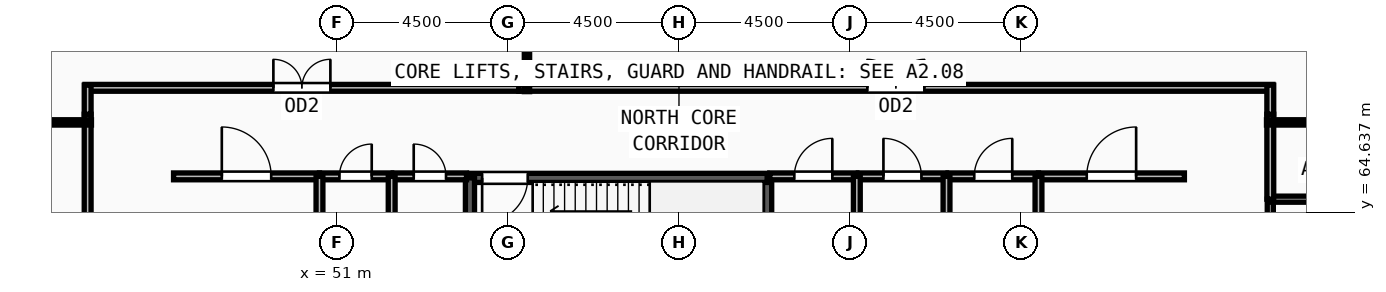
"""IFC4 building model, lengths in metres.
Left out: names, types, materials, properties, quantities, classifications, styles, units other than length and angle.
Written with IfcOpenShell. Run it as: python <this file> out.ifc"""

import sys

from ifc_helpers import new_model, si_unit, direction, frame, frame_2d, origin, place, context, subcontext, project, spatial, rectangle, extrude, source, transform, mapped, element, fill, save


model = new_model("IFC4")
c1 = context("Model", 3, precision=1e-05, world=origin(), true_north=direction((0.0, 1.0)))
c2 = subcontext(c1, "Body", "Model", "MODEL_VIEW")
j1 = project(units=[si_unit("LENGTHUNIT", "METRE"), si_unit("PLANEANGLEUNIT", "RADIAN")], contexts=[c1])
p1 = place(None, origin())
s1 = spatial("IfcSite", under=j1, at=p1, CompositionType="ELEMENT")
p2 = place(p1, origin())
s2 = spatial("IfcBuilding", under=s1, at=p2, CompositionType="ELEMENT")
p3 = place(p2, frame((0.0, 0.0, 39.75)))
s3 = spatial("IfcBuildingStorey", under=s2, at=p3, CompositionType="ELEMENT", Elevation=39.75)
p4 = place(p3, frame((62.32, 62.1, 0.0), z_axis=(0.0, 0.0, 1.0), x_axis=(0.0, 1.0, 0.0)))
e1 = element("IfcWall", 1, at=p4, inside=s3, PredefinedType="SOLIDWALL", context=c2, shape_type="SweptSolid", body=[
    extrude(rectangle(XDim=3.44, YDim=0.24, at=frame_2d((1.72, 0.0))), origin(), (0.0, 0.0, 1.0), 3.57),
])
p5 = place(p3, frame((62.32, 65.54, 0.0), z_axis=(0.0, 0.0, 1.0), x_axis=(-1.0, 0.0, 0.0)))
e2 = element("IfcWall", 2, at=p5, inside=s3, PredefinedType="SOLIDWALL", context=c2, shape_type="SweptSolid", body=[
    extrude(rectangle(XDim=7.82, YDim=0.24, at=frame_2d((3.91, 0.0))), origin(), (0.0, 0.0, 1.0), 3.57),
])
m1 = source(origin(), c2, "Body", "SweptSolid", [
    extrude(rectangle(XDim=1.2, YDim=2.2, at=frame_2d((0.6, 1.1))), frame((0.0, 0.13, 0.0), z_axis=(0.0, -1.0, 0.0), x_axis=(1.0, 0.0, 0.0)), (0.0, 0.0, 1.0), 0.26),
])
p6 = place(p5, frame((6.3, 0.0, 0.0)))
e3 = element("IfcOpeningElement", 3, at=p6, cuts=e2, PredefinedType="OPENING", context=c2, shape_type="MappedRepresentation", body=[
    mapped(m1, transform((0.0, 0.0, 0.0), x_axis=(1.0, 0.0, 0.0), y_axis=(0.0, 1.0, 0.0), z_axis=(0.0, 0.0, 1.0), scale=1.0)),
])
p7 = place(p3, frame((54.5, 65.54, 0.0), z_axis=(0.0, 0.0, 1.0), x_axis=(0.0, -1.0, 0.0)))
e4 = element("IfcWall", 4, at=p7, inside=s3, PredefinedType="SOLIDWALL", context=c2, shape_type="SweptSolid", body=[
    extrude(rectangle(XDim=3.44, YDim=0.24, at=frame_2d((1.72, 0.0))), origin(), (0.0, 0.0, 1.0), 3.57),
])
p8 = place(p3, frame((75.56, 62.24, 0.0), z_axis=(0.0, 0.0, 1.0), x_axis=(0.0, 1.0, 0.0)))
e5 = element("IfcWall", 5, at=p8, inside=s3, PredefinedType="PARTITIONING", context=c2, shape_type="SweptSolid", body=[
    extrude(rectangle(XDim=2.74, YDim=0.16, at=frame_2d((1.37, 0.0))), origin(), (0.0, 0.0, 1.0), 3.57),
])
m2 = source(origin(), c2, "Body", "SweptSolid", [
    extrude(rectangle(XDim=1.05, YDim=2.15, at=frame_2d((0.525, 1.075))), frame((0.0, 0.09, 0.0), z_axis=(0.0, -1.0, 0.0), x_axis=(1.0, 0.0, 0.0)), (0.0, 0.0, 1.0), 0.18),
])
p9 = place(p8, frame((0.845, 0.0, 0.0)))
e6 = element("IfcOpeningElement", 6, at=p9, cuts=e5, PredefinedType="OPENING", context=c2, shape_type="MappedRepresentation", body=[
    mapped(m2, transform((0.0, 0.0, 0.0), x_axis=(1.0, 0.0, 0.0), y_axis=(0.0, 1.0, 0.0), z_axis=(0.0, 0.0, 1.0), scale=1.0)),
])
p10 = place(p3, frame((50.54, 65.58, 0.0), z_axis=(0.0, 0.0, 1.0), x_axis=(1.0, 0.0, 0.0)))
e7 = element("IfcWall", 7, at=p10, inside=s3, PredefinedType="PARTITIONING", context=c2, shape_type="SweptSolid", body=[
    extrude(rectangle(XDim=1.9, YDim=0.18, at=frame_2d((0.95, 0.0))), origin(), (0.0, 0.0, 1.0), 3.57),
])
m3 = source(origin(), c2, "Body", "SweptSolid", [
    extrude(rectangle(XDim=0.85, YDim=2.1, at=frame_2d((0.425, 1.05))), frame((0.0, 0.1, 0.0), z_axis=(0.0, -1.0, 0.0), x_axis=(1.0, 0.0, 0.0)), (0.0, 0.0, 1.0), 0.2),
])
p11 = place(p10, frame((0.525, 0.0, 0.0)))
e8 = element("IfcOpeningElement", 8, at=p11, cuts=e7, PredefinedType="OPENING", context=c2, shape_type="MappedRepresentation", body=[
    mapped(m3, transform((0.0, 0.0, 0.0), x_axis=(1.0, 0.0, 0.0), y_axis=(0.0, 1.0, 0.0), z_axis=(0.0, 0.0, 1.0), scale=1.0)),
])
p12 = place(p3, frame((52.48, 65.58, 0.0), z_axis=(0.0, 0.0, 1.0), x_axis=(1.0, 0.0, 0.0)))
e9 = element("IfcWall", 9, at=p12, inside=s3, PredefinedType="PARTITIONING", context=c2, shape_type="SweptSolid", body=[
    extrude(rectangle(XDim=1.93, YDim=0.18, at=frame_2d((0.965, 0.0))), origin(), (0.0, 0.0, 1.0), 3.57),
])
p13 = place(p12, frame((0.54, 0.0, 0.0)))
e10 = element("IfcOpeningElement", 10, at=p13, cuts=e9, PredefinedType="OPENING", context=c2, shape_type="MappedRepresentation", body=[
    mapped(m3, transform((0.0, 0.0, 0.0), x_axis=(1.0, 0.0, 0.0), y_axis=(0.0, 1.0, 0.0), z_axis=(0.0, 0.0, 1.0), scale=1.0)),
])
p14 = place(p3, frame((62.39, 65.58, 0.0), z_axis=(0.0, 0.0, 1.0), x_axis=(1.0, 0.0, 0.0)))
e11 = element("IfcWall", 11, at=p14, inside=s3, PredefinedType="PARTITIONING", context=c2, shape_type="SweptSolid", body=[
    extrude(rectangle(XDim=2.29, YDim=0.18, at=frame_2d((1.145, 0.0))), origin(), (0.0, 0.0, 1.0), 3.57),
])
m4 = source(origin(), c2, "Body", "SweptSolid", [
    extrude(rectangle(XDim=1.0, YDim=2.2, at=frame_2d((0.5, 1.1))), frame((0.0, 0.1, 0.0), z_axis=(0.0, -1.0, 0.0), x_axis=(1.0, 0.0, 0.0)), (0.0, 0.0, 1.0), 0.2),
])
p15 = place(p14, frame((0.645, 0.0, 0.0)))
e12 = element("IfcOpeningElement", 12, at=p15, cuts=e11, PredefinedType="OPENING", context=c2, shape_type="MappedRepresentation", body=[
    mapped(m4, transform((0.0, 0.0, 0.0), x_axis=(1.0, 0.0, 0.0), y_axis=(0.0, 1.0, 0.0), z_axis=(0.0, 0.0, 1.0), scale=1.0)),
])
p16 = place(p3, frame((64.72, 65.58, 0.0), z_axis=(0.0, 0.0, 1.0), x_axis=(1.0, 0.0, 0.0)))
e13 = element("IfcWall", 13, at=p16, inside=s3, PredefinedType="PARTITIONING", context=c2, shape_type="SweptSolid", body=[
    extrude(rectangle(XDim=2.32, YDim=0.18, at=frame_2d((1.16, 0.0))), origin(), (0.0, 0.0, 1.0), 3.57),
])
p17 = place(p16, frame((0.66, 0.0, 0.0)))
e14 = element("IfcOpeningElement", 14, at=p17, cuts=e13, PredefinedType="OPENING", context=c2, shape_type="MappedRepresentation", body=[
    mapped(m4, transform((0.0, 0.0, 0.0), x_axis=(1.0, 0.0, 0.0), y_axis=(0.0, 1.0, 0.0), z_axis=(0.0, 0.0, 1.0), scale=1.0)),
])
p18 = place(p3, frame((67.08, 65.58, 0.0), z_axis=(0.0, 0.0, 1.0), x_axis=(1.0, 0.0, 0.0)))
e15 = element("IfcWall", 15, at=p18, inside=s3, PredefinedType="PARTITIONING", context=c2, shape_type="SweptSolid", body=[
    extrude(rectangle(XDim=2.38, YDim=0.18, at=frame_2d((1.19, 0.0))), origin(), (0.0, 0.0, 1.0), 3.57),
])
p19 = place(p18, frame((0.69, 0.0, 0.0)))
e16 = element("IfcOpeningElement", 16, at=p19, cuts=e15, PredefinedType="OPENING", context=c2, shape_type="MappedRepresentation", body=[
    mapped(m4, transform((0.0, 0.0, 0.0), x_axis=(1.0, 0.0, 0.0), y_axis=(0.0, 1.0, 0.0), z_axis=(0.0, 0.0, 1.0), scale=1.0)),
])
p20 = place(p3, frame((46.7, 65.58, 0.0), z_axis=(0.0, 0.0, 1.0), x_axis=(1.0, 0.0, 0.0)))
e17 = element("IfcWall", 17, at=p20, inside=s3, PredefinedType="PARTITIONING", context=c2, shape_type="SweptSolid", body=[
    extrude(rectangle(XDim=3.84, YDim=0.18, at=frame_2d((1.92, 0.0))), origin(), (0.0, 0.0, 1.0), 3.57),
])
m5 = source(origin(), c2, "Body", "SweptSolid", [
    extrude(rectangle(XDim=1.3, YDim=2.2, at=frame_2d((0.65, 1.1))), frame((0.0, 0.1, 0.0), z_axis=(0.0, -1.0, 0.0), x_axis=(1.0, 0.0, 0.0)), (0.0, 0.0, 1.0), 0.2),
])
p21 = place(p20, frame((1.27, 0.0, 0.0)))
e18 = element("IfcOpeningElement", 18, at=p21, cuts=e17, PredefinedType="OPENING", context=c2, shape_type="MappedRepresentation", body=[
    mapped(m5, transform((0.0, 0.0, 0.0), x_axis=(1.0, 0.0, 0.0), y_axis=(0.0, 1.0, 0.0), z_axis=(0.0, 0.0, 1.0), scale=1.0)),
])
p22 = place(p3, frame((69.46, 65.58, 0.0), z_axis=(0.0, 0.0, 1.0), x_axis=(1.0, 0.0, 0.0)))
e19 = element("IfcWall", 19, at=p22, inside=s3, PredefinedType="PARTITIONING", context=c2, shape_type="SweptSolid", body=[
    extrude(rectangle(XDim=3.84, YDim=0.18, at=frame_2d((1.92, 0.0))), origin(), (0.0, 0.0, 1.0), 3.57),
])
p23 = place(p22, frame((1.27, 0.0, 0.0)))
e20 = element("IfcOpeningElement", 20, at=p23, cuts=e19, PredefinedType="OPENING", context=c2, shape_type="MappedRepresentation", body=[
    mapped(m5, transform((0.0, 0.0, 0.0), x_axis=(1.0, 0.0, 0.0), y_axis=(0.0, 1.0, 0.0), z_axis=(0.0, 0.0, 1.0), scale=1.0)),
])
p24 = place(p3, frame((55.785, 67.91, 0.0), z_axis=(0.0, 0.0, 1.0), x_axis=(1.0, 0.0, 0.0)))
e21 = element("IfcWall", 21, at=p24, inside=s3, PredefinedType="PARTITIONING", context=c2, shape_type="SweptSolid", body=[
    extrude(rectangle(XDim=19.845, YDim=0.18, at=frame_2d((9.922, 0.0))), origin(), (0.0, 0.0, 1.0), 3.57),
])
m6 = source(origin(), c2, "Body", "SweptSolid", [
    extrude(rectangle(XDim=1.5, YDim=2.2, at=frame_2d((0.75, 1.1))), frame((0.0, 0.1, 0.0), z_axis=(0.0, -1.0, 0.0), x_axis=(1.0, 0.0, 0.0)), (0.0, 0.0, 1.0), 0.2),
])
p25 = place(p24, frame((9.172, 0.0, 0.0)))
e22 = element("IfcOpeningElement", 22, at=p25, cuts=e21, PredefinedType="OPENING", context=c2, shape_type="MappedRepresentation", body=[
    mapped(m6, transform((0.0, 0.0, 0.0), x_axis=(1.0, 0.0, 0.0), y_axis=(0.0, 1.0, 0.0), z_axis=(0.0, 0.0, 1.0), scale=1.0)),
])
p26 = place(p3, frame((44.37, 67.91, 0.0), z_axis=(0.0, 0.0, 1.0), x_axis=(1.0, 0.0, 0.0)))
e23 = element("IfcWall", 23, at=p26, inside=s3, PredefinedType="PARTITIONING", context=c2, shape_type="SweptSolid", body=[
    extrude(rectangle(XDim=11.415, YDim=0.18, at=frame_2d((5.708, 0.0))), origin(), (0.0, 0.0, 1.0), 3.57),
])
p27 = place(p26, frame((4.957, 0.0, 0.0)))
e24 = element("IfcOpeningElement", 24, at=p27, cuts=e23, PredefinedType="OPENING", context=c2, shape_type="MappedRepresentation", body=[
    mapped(m6, transform((0.0, 0.0, 0.0), x_axis=(1.0, 0.0, 0.0), y_axis=(0.0, 1.0, 0.0), z_axis=(0.0, 0.0, 1.0), scale=1.0)),
])
p28 = place(p3, frame((44.44, 54.785, 0.0), z_axis=(0.0, 0.0, 1.0), x_axis=(0.0, 1.0, 0.0)))
e25 = element("IfcWall", 25, at=p28, inside=s3, PredefinedType="PARTITIONING", context=c2, shape_type="SweptSolid", body=[
    extrude(rectangle(XDim=12.43, YDim=0.18, at=frame_2d((6.215, 0.0))), origin(), (0.0, 0.0, 1.0), 3.57),
])
p29 = place(p28, frame((5.465, 0.0, 0.0)))
e26 = element("IfcOpeningElement", 26, at=p29, cuts=e25, PredefinedType="OPENING", context=c2, shape_type="MappedRepresentation", body=[
    mapped(m6, transform((0.0, 0.0, 0.0), x_axis=(1.0, 0.0, 0.0), y_axis=(0.0, 1.0, 0.0), z_axis=(0.0, 0.0, 1.0), scale=1.0)),
])
p30 = place(p3, frame((75.56, 64.98, 0.0), z_axis=(0.0, 0.0, 1.0), x_axis=(1.0, 0.0, 0.0)))
e27 = element("IfcWall", 27, at=p30, inside=s3, PredefinedType="PARTITIONING", context=c2, shape_type="SweptSolid", body=[
    extrude(rectangle(XDim=4.46, YDim=0.16, at=frame_2d((2.23, 0.0))), origin(), (0.0, 0.0, 1.0), 3.57),
])
for number, where, z_axis, x_axis in (
    (28, (50.54, 61.95, 0.0), (0.0, 0.0, 1.0), (0.0, 1.0, 0.0)),
    (29, (52.44, 61.95, 0.0), (0.0, 0.0, 1.0), (0.0, 1.0, 0.0)),
    (30, (64.68, 61.95, 0.0), (0.0, 0.0, 1.0), (0.0, 1.0, 0.0)),
    (31, (67.04, 61.95, 0.0), (0.0, 0.0, 1.0), (0.0, 1.0, 0.0)),
    (32, (69.46, 61.95, 0.0), (0.0, 0.0, 1.0), (0.0, 1.0, 0.0)),
):
    element("IfcWall", number, at=place(p3, frame(where, z_axis=z_axis, x_axis=x_axis)), inside=s3, PredefinedType="PARTITIONING", context=c2, shape_type="SweptSolid", body=[
        extrude(rectangle(XDim=3.63, YDim=0.18, at=frame_2d((1.815, 0.0))), origin(), (0.0, 0.0, 1.0), 3.57),
    ])
p31 = place(p3, frame((75.56, 67.215, 0.0), z_axis=(0.0, 0.0, 1.0), x_axis=(0.0, -1.0, 0.0)))
e33 = element("IfcWall", 33, at=p31, inside=s3, PredefinedType="PARTITIONING", context=c2, shape_type="SweptSolid", body=[
    extrude(rectangle(XDim=2.235, YDim=0.18, at=frame_2d((1.118, 0.0))), origin(), (0.0, 0.0, 1.0), 3.57),
])
for number, where, z_axis, x_axis in (
    (34, (75.56, 67.98, 0.0), (0.0, 0.0, 1.0), (0.0, -1.0, 0.0)),
    (35, (44.44, 67.215, 0.0), (0.0, 0.0, 1.0), (0.0, 1.0, 0.0)),
):
    element("IfcWall", number, at=place(p3, frame(where, z_axis=z_axis, x_axis=x_axis)), inside=s3, PredefinedType="PARTITIONING", context=c2, shape_type="SweptSolid", body=[
        extrude(rectangle(XDim=0.765, YDim=0.18, at=frame_2d((0.382, 0.0))), origin(), (0.0, 0.0, 1.0), 3.57),
    ])
p32 = place(p3, frame((44.54, 67.0, 0.0), z_axis=(0.0, 0.0, 1.0), x_axis=(-1.0, 0.0, 0.0)))
e36 = element("IfcWall", 36, at=p32, inside=s3, PredefinedType="PARTITIONING", context=c2, shape_type="SweptSolid", body=[
    extrude(rectangle(XDim=23.084, YDim=0.14, at=frame_2d((11.542, 0.0))), origin(), (0.0, 0.0, 1.0), 2.655),
])
p33 = place(p3, frame((75.46, 67.0, 0.0), z_axis=(0.0, 0.0, 1.0), x_axis=(1.0, 0.0, 0.0)))
e37 = element("IfcWall", 37, at=p33, inside=s3, PredefinedType="PARTITIONING", context=c2, shape_type="SweptSolid", body=[
    extrude(rectangle(XDim=23.116, YDim=0.14, at=frame_2d((11.558, 0.0))), origin(), (0.0, 0.0, 1.0), 2.655),
])
p34 = place(p3, frame((56.0, 67.81, 0.0), z_axis=(0.0, 0.0, 1.0), x_axis=(0.0, 1.0, 0.0)))
e38 = element("IfcWall", 38, at=p34, inside=s3, PredefinedType="PARTITIONING", context=c2, shape_type="SweptSolid", body=[
    extrude(rectangle(XDim=14.865, YDim=0.14, at=frame_2d((7.433, 0.0))), origin(), (0.0, 0.0, 1.0), 3.57),
])
m7 = source(origin(), c2, "Body", "SweptSolid", [
    extrude(rectangle(XDim=1.2, YDim=2.2, at=frame_2d((0.6, 1.1))), frame((0.0, 0.025, 0.0), z_axis=(0.0, -1.0, 0.0), x_axis=(1.0, 0.0, 0.0)), (0.0, 0.0, 1.0), 0.05),
])
p35 = place(p6, origin())
e39 = element("IfcDoor", 39, at=p35, inside=s3, OperationType="SINGLE_SWING_RIGHT", PredefinedType="DOOR", context=c2, shape_type="MappedRepresentation", body=[
    mapped(m7, transform((0.0, 0.0, 0.0), x_axis=(1.0, 0.0, 0.0), y_axis=(0.0, 1.0, 0.0), z_axis=(0.0, 0.0, 1.0), scale=1.0)),
])
fill(e3, e39)
m8 = source(origin(), c2, "Body", "SweptSolid", [
    extrude(rectangle(XDim=0.85, YDim=2.1, at=frame_2d((0.425, 1.05))), frame((0.0, 0.025, 0.0), z_axis=(0.0, -1.0, 0.0), x_axis=(1.0, 0.0, 0.0)), (0.0, 0.0, 1.0), 0.05),
])
p36 = place(p11, origin())
e40 = element("IfcDoor", 40, at=p36, inside=s3, OperationType="SINGLE_SWING_RIGHT", PredefinedType="DOOR", context=c2, shape_type="MappedRepresentation", body=[
    mapped(m8, transform((0.0, 0.0, 0.0), x_axis=(1.0, 0.0, 0.0), y_axis=(0.0, 1.0, 0.0), z_axis=(0.0, 0.0, 1.0), scale=1.0)),
])
fill(e8, e40)
p37 = place(p13, origin())
e41 = element("IfcDoor", 41, at=p37, inside=s3, OperationType="SINGLE_SWING_LEFT", PredefinedType="DOOR", context=c2, shape_type="MappedRepresentation", body=[
    mapped(m8, transform((0.0, 0.0, 0.0), x_axis=(1.0, 0.0, 0.0), y_axis=(0.0, 1.0, 0.0), z_axis=(0.0, 0.0, 1.0), scale=1.0)),
])
fill(e10, e41)
m9 = source(origin(), c2, "Body", "SweptSolid", [
    extrude(rectangle(XDim=1.0, YDim=2.2, at=frame_2d((0.5, 1.1))), frame((0.0, 0.025, 0.0), z_axis=(0.0, -1.0, 0.0), x_axis=(1.0, 0.0, 0.0)), (0.0, 0.0, 1.0), 0.05),
])
p38 = place(p15, origin())
e42 = element("IfcDoor", 42, at=p38, inside=s3, OperationType="SINGLE_SWING_RIGHT", PredefinedType="DOOR", context=c2, shape_type="MappedRepresentation", body=[
    mapped(m9, transform((0.0, 0.0, 0.0), x_axis=(1.0, 0.0, 0.0), y_axis=(0.0, 1.0, 0.0), z_axis=(0.0, 0.0, 1.0), scale=1.0)),
])
fill(e12, e42)
p39 = place(p17, origin())
e43 = element("IfcDoor", 43, at=p39, inside=s3, OperationType="SINGLE_SWING_LEFT", PredefinedType="DOOR", context=c2, shape_type="MappedRepresentation", body=[
    mapped(m9, transform((0.0, 0.0, 0.0), x_axis=(1.0, 0.0, 0.0), y_axis=(0.0, 1.0, 0.0), z_axis=(0.0, 0.0, 1.0), scale=1.0)),
])
fill(e14, e43)
p40 = place(p19, origin())
e44 = element("IfcDoor", 44, at=p40, inside=s3, OperationType="SINGLE_SWING_RIGHT", PredefinedType="DOOR", context=c2, shape_type="MappedRepresentation", body=[
    mapped(m9, transform((0.0, 0.0, 0.0), x_axis=(1.0, 0.0, 0.0), y_axis=(0.0, 1.0, 0.0), z_axis=(0.0, 0.0, 1.0), scale=1.0)),
])
fill(e16, e44)
m10 = source(origin(), c2, "Body", "SweptSolid", [
    extrude(rectangle(XDim=1.3, YDim=2.2, at=frame_2d((0.65, 1.1))), frame((0.0, 0.025, 0.0), z_axis=(0.0, -1.0, 0.0), x_axis=(1.0, 0.0, 0.0)), (0.0, 0.0, 1.0), 0.05),
])
p41 = place(p21, origin())
e45 = element("IfcDoor", 45, at=p41, inside=s3, OperationType="SINGLE_SWING_LEFT", PredefinedType="DOOR", context=c2, shape_type="MappedRepresentation", body=[
    mapped(m10, transform((0.0, 0.0, 0.0), x_axis=(1.0, 0.0, 0.0), y_axis=(0.0, 1.0, 0.0), z_axis=(0.0, 0.0, 1.0), scale=1.0)),
])
fill(e18, e45)
p42 = place(p23, origin())
e46 = element("IfcDoor", 46, at=p42, inside=s3, OperationType="SINGLE_SWING_RIGHT", PredefinedType="DOOR", context=c2, shape_type="MappedRepresentation", body=[
    mapped(m10, transform((0.0, 0.0, 0.0), x_axis=(1.0, 0.0, 0.0), y_axis=(0.0, 1.0, 0.0), z_axis=(0.0, 0.0, 1.0), scale=1.0)),
])
fill(e20, e46)
m11 = source(origin(), c2, "Body", "SweptSolid", [
    extrude(rectangle(XDim=1.5, YDim=2.2, at=frame_2d((0.75, 1.1))), frame((0.0, 0.025, 0.0), z_axis=(0.0, -1.0, 0.0), x_axis=(1.0, 0.0, 0.0)), (0.0, 0.0, 1.0), 0.05),
])
p43 = place(p25, origin())
e47 = element("IfcDoor", 47, at=p43, inside=s3, OperationType="DOUBLE_DOOR_SINGLE_SWING", PredefinedType="DOOR", context=c2, shape_type="MappedRepresentation", body=[
    mapped(m11, transform((0.0, 0.0, 0.0), x_axis=(1.0, 0.0, 0.0), y_axis=(0.0, 1.0, 0.0), z_axis=(0.0, 0.0, 1.0), scale=1.0)),
])
fill(e22, e47)
p44 = place(p27, origin())
e48 = element("IfcDoor", 48, at=p44, inside=s3, OperationType="DOUBLE_DOOR_SINGLE_SWING", PredefinedType="DOOR", context=c2, shape_type="MappedRepresentation", body=[
    mapped(m11, transform((0.0, 0.0, 0.0), x_axis=(1.0, 0.0, 0.0), y_axis=(0.0, 1.0, 0.0), z_axis=(0.0, 0.0, 1.0), scale=1.0)),
])
fill(e24, e48)
save(model, sys.argv[1])
